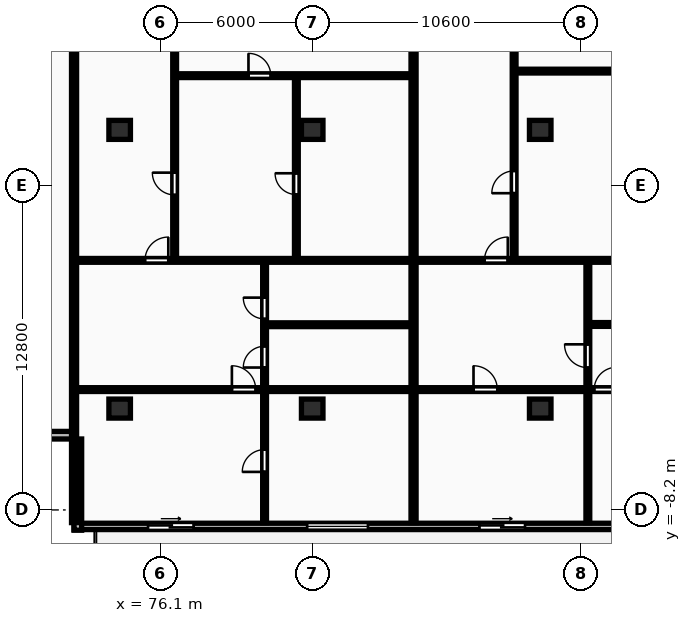
"""IFC4 building model, lengths in metres.
Left out: names, types, materials, properties, quantities, classifications, styles, units other than length and angle.
Written with IfcOpenShell. Run it as: python <this file> out.ifc"""

import sys

from ifc_helpers import new_model, si_unit, direction, frame, frame_2d, origin, origin_2d, place, context, subcontext, project, spatial, rectangle, extrude, element, fill, save


model = new_model("IFC4")
c1 = context("Model", 3, precision=1e-05, world=origin(), true_north=direction((0.0, 1.0)))
c2 = subcontext(c1, "Body", "Model", "MODEL_VIEW")
j1 = project(units=[si_unit("LENGTHUNIT", "METRE"), si_unit("PLANEANGLEUNIT", "RADIAN")], contexts=[c1])
p1 = place(None, origin())
s1 = spatial("IfcSite", under=j1, at=p1, CompositionType="ELEMENT")
p2 = place(p1, origin())
s2 = spatial("IfcBuilding", under=s1, at=p2, CompositionType="ELEMENT")
p3 = place(p2, frame((0.0, 0.0, 80.8)))
s3 = spatial("IfcBuildingStorey", under=s2, at=p3, CompositionType="ELEMENT", Elevation=80.8)
for number, where, z_axis, x_axis in (
    (1, (74.5, -4.2, 0.0), (0.0, 0.0, 1.0), (1.0, 0.0, 0.0)),
    (2, (74.5, 6.8, 0.0), (0.0, 0.0, 1.0), (1.0, 0.0, 0.0)),
    (3, (82.1, -4.2, 0.0), (0.0, 0.0, 1.0), (1.0, 0.0, 0.0)),
    (4, (82.1, 6.8, 0.0), (0.0, 0.0, 1.0), (1.0, 0.0, 0.0)),
    (5, (91.1, -4.2, 0.0), (0.0, 0.0, 1.0), (1.0, 0.0, 0.0)),
    (6, (91.1, 6.8, 0.0), (0.0, 0.0, 1.0), (1.0, 0.0, 0.0)),
):
    element("IfcColumn", number, at=place(p3, frame(where, z_axis=z_axis, x_axis=x_axis)), inside=s3, PredefinedType="COLUMN", context=c2, shape_type="SweptSolid", body=[
        extrude(rectangle(XDim=0.85, YDim=0.75, at=origin_2d()), origin(), (0.0, 0.0, 1.0), 3.25),
    ])
p4 = place(p3, frame((72.7, -8.85, 0.0), z_axis=(0.0, 0.0, 1.0), x_axis=(1.0, 0.0, 0.0)))
e7 = element("IfcWall", 7, at=p4, inside=s3, PredefinedType="STANDARD", context=c2, shape_type="SweptSolid", body=[
    extrude(rectangle(XDim=58.0, YDim=0.25, at=frame_2d((29.0, 0.0))), origin(), (0.0, 0.0, 1.0), 2.97),
])
p5 = place(p4, frame((2.92, 0.0, 0.0)))
e8 = element("IfcOpeningElement", 8, at=p5, cuts=e7, PredefinedType="OPENING", context=c2, shape_type="SweptSolid", body=[
    extrude(rectangle(XDim=1.8, YDim=2.2, at=frame_2d((0.9, 1.1))), frame((0.0, 0.135, 0.0), z_axis=(0.0, -1.0, 0.0), x_axis=(1.0, 0.0, 0.0)), (0.0, 0.0, 1.0), 0.27),
])
p6 = place(p4, frame((9.2, 0.0, 0.85)))
e9 = element("IfcOpeningElement", 9, at=p6, cuts=e7, PredefinedType="OPENING", context=c2, shape_type="SweptSolid", body=[
    extrude(rectangle(XDim=2.4, YDim=1.9, at=frame_2d((1.2, 0.95))), frame((0.0, 0.135, 0.0), z_axis=(0.0, -1.0, 0.0), x_axis=(1.0, 0.0, 0.0)), (0.0, 0.0, 1.0), 0.27),
])
p7 = place(p4, frame((21.7, 0.0, 0.85)))
e10 = element("IfcOpeningElement", 10, at=p7, cuts=e7, PredefinedType="OPENING", context=c2, shape_type="SweptSolid", body=[
    extrude(rectangle(XDim=2.4, YDim=1.9, at=frame_2d((1.2, 0.95))), frame((0.0, 0.135, 0.0), z_axis=(0.0, -1.0, 0.0), x_axis=(1.0, 0.0, 0.0)), (0.0, 0.0, 1.0), 0.27),
])
p8 = place(p4, frame((16.0, 0.0, 0.0)))
e11 = element("IfcOpeningElement", 11, at=p8, cuts=e7, PredefinedType="OPENING", context=c2, shape_type="SweptSolid", body=[
    extrude(rectangle(XDim=1.8, YDim=2.2, at=frame_2d((0.9, 1.1))), frame((0.0, 0.135, 0.0), z_axis=(0.0, -1.0, 0.0), x_axis=(1.0, 0.0, 0.0)), (0.0, 0.0, 1.0), 0.27),
])
p9 = place(p4, frame((27.1, 0.0, 0.85)))
e12 = element("IfcOpeningElement", 12, at=p9, cuts=e7, PredefinedType="OPENING", context=c2, shape_type="SweptSolid", body=[
    extrude(rectangle(XDim=2.4, YDim=1.9, at=frame_2d((1.2, 0.95))), frame((0.0, 0.135, 0.0), z_axis=(0.0, -1.0, 0.0), x_axis=(1.0, 0.0, 0.0)), (0.0, 0.0, 1.0), 0.27),
])
p10 = place(p4, frame((35.85, 0.0, 0.0)))
e13 = element("IfcOpeningElement", 13, at=p10, cuts=e7, PredefinedType="OPENING", context=c2, shape_type="SweptSolid", body=[
    extrude(rectangle(XDim=1.8, YDim=2.2, at=frame_2d((0.9, 1.1))), frame((0.0, 0.135, 0.0), z_axis=(0.0, -1.0, 0.0), x_axis=(1.0, 0.0, 0.0)), (0.0, 0.0, 1.0), 0.27),
])
p11 = place(p4, frame((42.93, 0.0, 0.85)))
e14 = element("IfcOpeningElement", 14, at=p11, cuts=e7, PredefinedType="OPENING", context=c2, shape_type="SweptSolid", body=[
    extrude(rectangle(XDim=1.8, YDim=1.8, at=frame_2d((0.9, 0.9))), frame((0.0, 0.135, 0.0), z_axis=(0.0, -1.0, 0.0), x_axis=(1.0, 0.0, 0.0)), (0.0, 0.0, 1.0), 0.27),
])
p12 = place(p4, frame((49.12, 0.0, 0.0)))
e15 = element("IfcOpeningElement", 15, at=p12, cuts=e7, PredefinedType="OPENING", context=c2, shape_type="SweptSolid", body=[
    extrude(rectangle(XDim=1.8, YDim=2.2, at=frame_2d((0.9, 1.1))), frame((0.0, 0.135, 0.0), z_axis=(0.0, -1.0, 0.0), x_axis=(1.0, 0.0, 0.0)), (0.0, 0.0, 1.0), 0.27),
])
p13 = place(p4, frame((54.9, 0.0, 0.85)))
e16 = element("IfcOpeningElement", 16, at=p13, cuts=e7, PredefinedType="OPENING", context=c2, shape_type="SweptSolid", body=[
    extrude(rectangle(XDim=2.4, YDim=1.9, at=frame_2d((1.2, 0.95))), frame((0.0, 0.135, 0.0), z_axis=(0.0, -1.0, 0.0), x_axis=(1.0, 0.0, 0.0)), (0.0, 0.0, 1.0), 0.27),
])
p14 = place(p3, frame((69.1, -5.25, 0.0), z_axis=(0.0, 0.0, 1.0), x_axis=(1.0, 0.0, 0.0)))
e17 = element("IfcWall", 17, at=p14, inside=s3, PredefinedType="STANDARD", context=c2, shape_type="SweptSolid", body=[
    extrude(rectangle(XDim=3.6, YDim=0.3, at=frame_2d((1.8, 0.0))), origin(), (0.0, 0.0, 1.0), 2.97),
])
p15 = place(p3, frame((72.85, -5.4, 0.0), z_axis=(0.0, 0.0, 1.0), x_axis=(0.0, -1.0, 0.0)))
e18 = element("IfcWall", 18, at=p15, inside=s3, PredefinedType="STANDARD", context=c2, shape_type="SweptSolid", body=[
    extrude(rectangle(XDim=3.6, YDim=0.3, at=frame_2d((1.8, 0.0))), origin(), (0.0, 0.0, 1.0), 2.97),
])
for number, where, z_axis, x_axis in (
    (19, (72.7, -8.7, 0.0), (0.0, 0.0, 1.0), (0.0, 1.0, 0.0)),
    (20, (86.1, -8.7, 0.0), (0.0, 0.0, 1.0), (0.0, 1.0, 0.0)),
):
    element("IfcWall", number, at=place(p3, frame(where, z_axis=z_axis, x_axis=x_axis)), inside=s3, PredefinedType="PARTITIONING", context=c2, shape_type="SweptSolid", body=[
        extrude(rectangle(XDim=24.87, YDim=0.2, at=frame_2d((12.435, 0.0))), origin(), (0.0, 0.0, 1.0), 2.97),
    ])
p16 = place(p3, frame((81.475, 1.69, 0.0), z_axis=(0.0, 0.0, 1.0), x_axis=(0.0, 1.0, 0.0)))
e21 = element("IfcWall", 21, at=p16, inside=s3, PredefinedType="PARTITIONING", context=c2, shape_type="SweptSolid", body=[
    extrude(rectangle(XDim=7.25, YDim=0.15, at=frame_2d((3.625, 0.0))), origin(), (0.0, 0.0, 1.0), 2.97),
])
p17 = place(p16, frame((2.558, 0.0, 0.0)))
e22 = element("IfcOpeningElement", 22, at=p17, cuts=e21, PredefinedType="OPENING", context=c2, shape_type="SweptSolid", body=[
    extrude(rectangle(XDim=0.84, YDim=2.04, at=frame_2d((0.42, 1.02))), frame((0.0, 0.085, 0.0), z_axis=(0.0, -1.0, 0.0), x_axis=(1.0, 0.0, 0.0)), (0.0, 0.0, 1.0), 0.17),
])
p18 = place(p3, frame((76.73, 8.94, 0.0), z_axis=(0.0, 0.0, 1.0), x_axis=(1.0, 0.0, 0.0)))
e23 = element("IfcWall", 23, at=p18, inside=s3, PredefinedType="PARTITIONING", context=c2, shape_type="SweptSolid", body=[
    extrude(rectangle(XDim=9.29, YDim=0.15, at=frame_2d((4.645, 0.0))), origin(), (0.0, 0.0, 1.0), 2.97),
])
p19 = place(p18, frame((2.854, 0.0, 0.0)))
e24 = element("IfcOpeningElement", 24, at=p19, cuts=e23, PredefinedType="OPENING", context=c2, shape_type="SweptSolid", body=[
    extrude(rectangle(XDim=0.88, YDim=2.06, at=frame_2d((0.44, 1.03))), frame((0.0, 0.085, 0.0), z_axis=(0.0, -1.0, 0.0), x_axis=(1.0, 0.0, 0.0)), (0.0, 0.0, 1.0), 0.17),
])
p20 = place(p3, frame((76.67, 1.69, 0.0), z_axis=(0.0, 0.0, 1.0), x_axis=(0.0, 1.0, 0.0)))
e25 = element("IfcWall", 25, at=p20, inside=s3, PredefinedType="PARTITIONING", context=c2, shape_type="SweptSolid", body=[
    extrude(rectangle(XDim=14.5, YDim=0.15, at=frame_2d((7.25, 0.0))), origin(), (0.0, 0.0, 1.0), 2.97),
])
p21 = place(p20, frame((2.542, 0.0, 0.0)))
e26 = element("IfcOpeningElement", 26, at=p21, cuts=e25, PredefinedType="OPENING", context=c2, shape_type="SweptSolid", body=[
    extrude(rectangle(XDim=0.88, YDim=2.06, at=frame_2d((0.44, 1.03))), frame((0.0, 0.085, 0.0), z_axis=(0.0, -1.0, 0.0), x_axis=(1.0, 0.0, 0.0)), (0.0, 0.0, 1.0), 0.17),
])
p22 = place(p3, frame((80.28, -0.89, 0.0), z_axis=(0.0, 0.0, 1.0), x_axis=(1.0, 0.0, 0.0)))
e27 = element("IfcWall", 27, at=p22, inside=s3, PredefinedType="PARTITIONING", context=c2, shape_type="SweptSolid", body=[
    extrude(rectangle(XDim=5.74, YDim=0.15, at=frame_2d((2.87, 0.0))), origin(), (0.0, 0.0, 1.0), 2.97),
])
p23 = place(p3, frame((80.22, -8.7, 0.0), z_axis=(0.0, 0.0, 1.0), x_axis=(0.0, 1.0, 0.0)))
e28 = element("IfcWall", 28, at=p23, inside=s3, PredefinedType="PARTITIONING", context=c2, shape_type="SweptSolid", body=[
    extrude(rectangle(XDim=10.31, YDim=0.15, at=frame_2d((5.155, 0.0))), origin(), (0.0, 0.0, 1.0), 2.97),
])
p24 = place(p23, frame((6.12, 0.0, 0.0)))
e29 = element("IfcOpeningElement", 29, at=p24, cuts=e28, PredefinedType="OPENING", context=c2, shape_type="SweptSolid", body=[
    extrude(rectangle(XDim=0.84, YDim=2.04, at=frame_2d((0.42, 1.02))), frame((0.0, 0.085, 0.0), z_axis=(0.0, -1.0, 0.0), x_axis=(1.0, 0.0, 0.0)), (0.0, 0.0, 1.0), 0.17),
])
p25 = place(p23, frame((8.04, 0.0, 0.0)))
e30 = element("IfcOpeningElement", 30, at=p25, cuts=e28, PredefinedType="OPENING", context=c2, shape_type="SweptSolid", body=[
    extrude(rectangle(XDim=0.84, YDim=2.04, at=frame_2d((0.42, 1.02))), frame((0.0, 0.085, 0.0), z_axis=(0.0, -1.0, 0.0), x_axis=(1.0, 0.0, 0.0)), (0.0, 0.0, 1.0), 0.17),
])
p26 = place(p23, frame((2.001, 0.0, 0.0)))
e31 = element("IfcOpeningElement", 31, at=p26, cuts=e28, PredefinedType="OPENING", context=c2, shape_type="SweptSolid", body=[
    extrude(rectangle(XDim=0.88, YDim=2.06, at=frame_2d((0.44, 1.03))), frame((0.0, 0.085, 0.0), z_axis=(0.0, -1.0, 0.0), x_axis=(1.0, 0.0, 0.0)), (0.0, 0.0, 1.0), 0.17),
])
p27 = place(p3, frame((72.78, 1.65, 0.0), z_axis=(0.0, 0.0, 1.0), x_axis=(1.0, 0.0, 0.0)))
e32 = element("IfcWall", 32, at=p27, inside=s3, PredefinedType="PARTITIONING", context=c2, shape_type="SweptSolid", body=[
    extrude(rectangle(XDim=13.24, YDim=0.15, at=frame_2d((6.62, 0.0))), origin(), (0.0, 0.0, 1.0), 2.97),
])
p28 = place(p27, frame((2.72, 0.0, 0.0)))
e33 = element("IfcOpeningElement", 33, at=p28, cuts=e32, PredefinedType="OPENING", context=c2, shape_type="SweptSolid", body=[
    extrude(rectangle(XDim=0.92, YDim=2.08, at=frame_2d((0.46, 1.04))), frame((0.0, 0.085, 0.0), z_axis=(0.0, -1.0, 0.0), x_axis=(1.0, 0.0, 0.0)), (0.0, 0.0, 1.0), 0.17),
])
p29 = place(p3, frame((72.78, -3.45, 0.0), z_axis=(0.0, 0.0, 1.0), x_axis=(1.0, 0.0, 0.0)))
e34 = element("IfcWall", 34, at=p29, inside=s3, PredefinedType="PARTITIONING", context=c2, shape_type="SweptSolid", body=[
    extrude(rectangle(XDim=13.24, YDim=0.15, at=frame_2d((6.62, 0.0))), origin(), (0.0, 0.0, 1.0), 2.97),
])
p30 = place(p29, frame((6.15, 0.0, 0.0)))
e35 = element("IfcOpeningElement", 35, at=p30, cuts=e34, PredefinedType="OPENING", context=c2, shape_type="SweptSolid", body=[
    extrude(rectangle(XDim=0.94, YDim=2.1, at=frame_2d((0.47, 1.05))), frame((0.0, 0.085, 0.0), z_axis=(0.0, -1.0, 0.0), x_axis=(1.0, 0.0, 0.0)), (0.0, 0.0, 1.0), 0.17),
])
p31 = place(p3, frame((90.13, 9.12, 0.0), z_axis=(0.0, 0.0, 1.0), x_axis=(1.0, 0.0, 0.0)))
e36 = element("IfcWall", 36, at=p31, inside=s3, PredefinedType="PARTITIONING", context=c2, shape_type="SweptSolid", body=[
    extrude(rectangle(XDim=13.69, YDim=0.15, at=frame_2d((6.845, 0.0))), origin(), (0.0, 0.0, 1.0), 2.97),
])
p32 = place(p31, frame((5.625, 0.0, 0.0)))
e37 = element("IfcOpeningElement", 37, at=p32, cuts=e36, PredefinedType="OPENING", context=c2, shape_type="SweptSolid", body=[
    extrude(rectangle(XDim=0.88, YDim=2.06, at=frame_2d((0.44, 1.03))), frame((0.0, 0.085, 0.0), z_axis=(0.0, -1.0, 0.0), x_axis=(1.0, 0.0, 0.0)), (0.0, 0.0, 1.0), 0.17),
])
p33 = place(p3, frame((90.07, 1.69, 0.0), z_axis=(0.0, 0.0, 1.0), x_axis=(0.0, 1.0, 0.0)))
e38 = element("IfcWall", 38, at=p33, inside=s3, PredefinedType="PARTITIONING", context=c2, shape_type="SweptSolid", body=[
    extrude(rectangle(XDim=14.5, YDim=0.15, at=frame_2d((7.25, 0.0))), origin(), (0.0, 0.0, 1.0), 2.97),
])
p34 = place(p33, frame((2.611, 0.0, 0.0)))
e39 = element("IfcOpeningElement", 39, at=p34, cuts=e38, PredefinedType="OPENING", context=c2, shape_type="SweptSolid", body=[
    extrude(rectangle(XDim=0.88, YDim=2.06, at=frame_2d((0.44, 1.03))), frame((0.0, 0.085, 0.0), z_axis=(0.0, -1.0, 0.0), x_axis=(1.0, 0.0, 0.0)), (0.0, 0.0, 1.0), 0.17),
])
p35 = place(p3, frame((92.98, -8.7, 0.0), z_axis=(0.0, 0.0, 1.0), x_axis=(0.0, 1.0, 0.0)))
e40 = element("IfcWall", 40, at=p35, inside=s3, PredefinedType="PARTITIONING", context=c2, shape_type="SweptSolid", body=[
    extrude(rectangle(XDim=10.31, YDim=0.15, at=frame_2d((5.155, 0.0))), origin(), (0.0, 0.0, 1.0), 2.97),
])
p36 = place(p35, frame((6.116, 0.0, 0.0)))
e41 = element("IfcOpeningElement", 41, at=p36, cuts=e40, PredefinedType="OPENING", context=c2, shape_type="SweptSolid", body=[
    extrude(rectangle(XDim=0.92, YDim=2.08, at=frame_2d((0.46, 1.04))), frame((0.0, 0.085, 0.0), z_axis=(0.0, -1.0, 0.0), x_axis=(1.0, 0.0, 0.0)), (0.0, 0.0, 1.0), 0.17),
])
p37 = place(p3, frame((93.02, -0.88, 0.0), z_axis=(0.0, 0.0, 1.0), x_axis=(1.0, 0.0, 0.0)))
e42 = element("IfcWall", 42, at=p37, inside=s3, PredefinedType="PARTITIONING", context=c2, shape_type="SweptSolid", body=[
    extrude(rectangle(XDim=10.8, YDim=0.15, at=frame_2d((5.4, 0.0))), origin(), (0.0, 0.0, 1.0), 2.97),
])
p38 = place(p37, frame((4.11, 0.0, 0.0)))
e43 = element("IfcOpeningElement", 43, at=p38, cuts=e42, PredefinedType="OPENING", context=c2, shape_type="SweptSolid", body=[
    extrude(rectangle(XDim=0.84, YDim=2.04, at=frame_2d((0.42, 1.02))), frame((0.0, 0.085, 0.0), z_axis=(0.0, -1.0, 0.0), x_axis=(1.0, 0.0, 0.0)), (0.0, 0.0, 1.0), 0.17),
])
p39 = place(p37, frame((5.45, 0.0, 0.0)))
e44 = element("IfcOpeningElement", 44, at=p39, cuts=e42, PredefinedType="OPENING", context=c2, shape_type="SweptSolid", body=[
    extrude(rectangle(XDim=0.84, YDim=2.04, at=frame_2d((0.42, 1.02))), frame((0.0, 0.085, 0.0), z_axis=(0.0, -1.0, 0.0), x_axis=(1.0, 0.0, 0.0)), (0.0, 0.0, 1.0), 0.17),
])
p40 = place(p3, frame((86.18, 1.65, 0.0), z_axis=(0.0, 0.0, 1.0), x_axis=(1.0, 0.0, 0.0)))
e45 = element("IfcWall", 45, at=p40, inside=s3, PredefinedType="PARTITIONING", context=c2, shape_type="SweptSolid", body=[
    extrude(rectangle(XDim=17.64, YDim=0.15, at=frame_2d((8.82, 0.0))), origin(), (0.0, 0.0, 1.0), 2.97),
])
p41 = place(p40, frame((2.72, 0.0, 0.0)))
e46 = element("IfcOpeningElement", 46, at=p41, cuts=e45, PredefinedType="OPENING", context=c2, shape_type="SweptSolid", body=[
    extrude(rectangle(XDim=0.92, YDim=2.08, at=frame_2d((0.46, 1.04))), frame((0.0, 0.085, 0.0), z_axis=(0.0, -1.0, 0.0), x_axis=(1.0, 0.0, 0.0)), (0.0, 0.0, 1.0), 0.17),
])
p42 = place(p3, frame((86.18, -3.45, 0.0), z_axis=(0.0, 0.0, 1.0), x_axis=(1.0, 0.0, 0.0)))
e47 = element("IfcWall", 47, at=p42, inside=s3, PredefinedType="PARTITIONING", context=c2, shape_type="SweptSolid", body=[
    extrude(rectangle(XDim=12.04, YDim=0.15, at=frame_2d((6.02, 0.0))), origin(), (0.0, 0.0, 1.0), 2.97),
])
p43 = place(p42, frame((2.287, 0.0, 0.0)))
e48 = element("IfcOpeningElement", 48, at=p43, cuts=e47, PredefinedType="OPENING", context=c2, shape_type="SweptSolid", body=[
    extrude(rectangle(XDim=0.94, YDim=2.1, at=frame_2d((0.47, 1.05))), frame((0.0, 0.085, 0.0), z_axis=(0.0, -1.0, 0.0), x_axis=(1.0, 0.0, 0.0)), (0.0, 0.0, 1.0), 0.17),
])
p44 = place(p42, frame((7.05, 0.0, 0.0)))
e49 = element("IfcOpeningElement", 49, at=p44, cuts=e47, PredefinedType="OPENING", context=c2, shape_type="SweptSolid", body=[
    extrude(rectangle(XDim=0.88, YDim=2.06, at=frame_2d((0.44, 1.03))), frame((0.0, 0.085, 0.0), z_axis=(0.0, -1.0, 0.0), x_axis=(1.0, 0.0, 0.0)), (0.0, 0.0, 1.0), 0.17),
])
p45 = place(p5, origin())
e50 = element("IfcDoor", 50, at=p45, inside=s3, OperationType="SLIDING_TO_RIGHT", PredefinedType="DOOR", context=c2, shape_type="SweptSolid", body=[
    extrude(rectangle(XDim=1.8, YDim=2.2, at=frame_2d((0.9, 1.1))), frame((0.0, 0.025, 0.0), z_axis=(0.0, -1.0, 0.0), x_axis=(1.0, 0.0, 0.0)), (0.0, 0.0, 1.0), 0.05),
])
fill(e8, e50)
p46 = place(p6, origin())
e51 = element("IfcWindow", 51, at=p46, inside=s3, PartitioningType="DOUBLE_PANEL_VERTICAL", PredefinedType="WINDOW", context=c2, shape_type="SweptSolid", body=[
    extrude(rectangle(XDim=2.4, YDim=1.9, at=frame_2d((1.2, 0.95))), frame((0.0, 0.03, 0.0), z_axis=(0.0, -1.0, 0.0), x_axis=(1.0, 0.0, 0.0)), (0.0, 0.0, 1.0), 0.06),
])
fill(e9, e51)
p47 = place(p8, origin())
e52 = element("IfcDoor", 52, at=p47, inside=s3, OperationType="SLIDING_TO_RIGHT", PredefinedType="DOOR", context=c2, shape_type="SweptSolid", body=[
    extrude(rectangle(XDim=1.8, YDim=2.2, at=frame_2d((0.9, 1.1))), frame((0.0, 0.025, 0.0), z_axis=(0.0, -1.0, 0.0), x_axis=(1.0, 0.0, 0.0)), (0.0, 0.0, 1.0), 0.05),
])
fill(e11, e52)
p48 = place(p17, origin())
e53 = element("IfcDoor", 53, at=p48, inside=s3, OperationType="SINGLE_SWING_RIGHT", PredefinedType="DOOR", context=c2, shape_type="SweptSolid", body=[
    extrude(rectangle(XDim=0.84, YDim=2.04, at=frame_2d((0.42, 1.02))), frame((0.0, 0.025, 0.0), z_axis=(0.0, -1.0, 0.0), x_axis=(1.0, 0.0, 0.0)), (0.0, 0.0, 1.0), 0.05),
])
fill(e22, e53)
p49 = place(p19, origin())
e54 = element("IfcDoor", 54, at=p49, inside=s3, OperationType="SINGLE_SWING_LEFT", PredefinedType="DOOR", context=c2, shape_type="SweptSolid", body=[
    extrude(rectangle(XDim=0.88, YDim=2.06, at=frame_2d((0.44, 1.03))), frame((0.0, 0.025, 0.0), z_axis=(0.0, -1.0, 0.0), x_axis=(1.0, 0.0, 0.0)), (0.0, 0.0, 1.0), 0.05),
])
fill(e24, e54)
p50 = place(p21, origin())
e55 = element("IfcDoor", 55, at=p50, inside=s3, OperationType="SINGLE_SWING_RIGHT", PredefinedType="DOOR", context=c2, shape_type="SweptSolid", body=[
    extrude(rectangle(XDim=0.88, YDim=2.06, at=frame_2d((0.44, 1.03))), frame((0.0, 0.025, 0.0), z_axis=(0.0, -1.0, 0.0), x_axis=(1.0, 0.0, 0.0)), (0.0, 0.0, 1.0), 0.05),
])
fill(e26, e55)
p51 = place(p24, origin())
e56 = element("IfcDoor", 56, at=p51, inside=s3, OperationType="SINGLE_SWING_LEFT", PredefinedType="DOOR", context=c2, shape_type="SweptSolid", body=[
    extrude(rectangle(XDim=0.84, YDim=2.04, at=frame_2d((0.42, 1.02))), frame((0.0, 0.025, 0.0), z_axis=(0.0, -1.0, 0.0), x_axis=(1.0, 0.0, 0.0)), (0.0, 0.0, 1.0), 0.05),
])
fill(e29, e56)
p52 = place(p25, origin())
e57 = element("IfcDoor", 57, at=p52, inside=s3, OperationType="SINGLE_SWING_RIGHT", PredefinedType="DOOR", context=c2, shape_type="SweptSolid", body=[
    extrude(rectangle(XDim=0.84, YDim=2.04, at=frame_2d((0.42, 1.02))), frame((0.0, 0.025, 0.0), z_axis=(0.0, -1.0, 0.0), x_axis=(1.0, 0.0, 0.0)), (0.0, 0.0, 1.0), 0.05),
])
fill(e30, e57)
p53 = place(p26, origin())
e58 = element("IfcDoor", 58, at=p53, inside=s3, OperationType="SINGLE_SWING_LEFT", PredefinedType="DOOR", context=c2, shape_type="SweptSolid", body=[
    extrude(rectangle(XDim=0.88, YDim=2.06, at=frame_2d((0.44, 1.03))), frame((0.0, 0.025, 0.0), z_axis=(0.0, -1.0, 0.0), x_axis=(1.0, 0.0, 0.0)), (0.0, 0.0, 1.0), 0.05),
])
fill(e31, e58)
p54 = place(p28, origin())
e59 = element("IfcDoor", 59, at=p54, inside=s3, OperationType="SINGLE_SWING_RIGHT", PredefinedType="DOOR", context=c2, shape_type="SweptSolid", body=[
    extrude(rectangle(XDim=0.92, YDim=2.08, at=frame_2d((0.46, 1.04))), frame((0.0, 0.025, 0.0), z_axis=(0.0, -1.0, 0.0), x_axis=(1.0, 0.0, 0.0)), (0.0, 0.0, 1.0), 0.05),
])
fill(e33, e59)
p55 = place(p30, origin())
e60 = element("IfcDoor", 60, at=p55, inside=s3, OperationType="SINGLE_SWING_LEFT", PredefinedType="DOOR", context=c2, shape_type="SweptSolid", body=[
    extrude(rectangle(XDim=0.94, YDim=2.1, at=frame_2d((0.47, 1.05))), frame((0.0, 0.025, 0.0), z_axis=(0.0, -1.0, 0.0), x_axis=(1.0, 0.0, 0.0)), (0.0, 0.0, 1.0), 0.05),
])
fill(e35, e60)
p56 = place(p34, origin())
e61 = element("IfcDoor", 61, at=p56, inside=s3, OperationType="SINGLE_SWING_LEFT", PredefinedType="DOOR", context=c2, shape_type="SweptSolid", body=[
    extrude(rectangle(XDim=0.88, YDim=2.06, at=frame_2d((0.44, 1.03))), frame((0.0, 0.025, 0.0), z_axis=(0.0, -1.0, 0.0), x_axis=(1.0, 0.0, 0.0)), (0.0, 0.0, 1.0), 0.05),
])
fill(e39, e61)
p57 = place(p36, origin())
e62 = element("IfcDoor", 62, at=p57, inside=s3, OperationType="SINGLE_SWING_RIGHT", PredefinedType="DOOR", context=c2, shape_type="SweptSolid", body=[
    extrude(rectangle(XDim=0.92, YDim=2.08, at=frame_2d((0.46, 1.04))), frame((0.0, 0.025, 0.0), z_axis=(0.0, -1.0, 0.0), x_axis=(1.0, 0.0, 0.0)), (0.0, 0.0, 1.0), 0.05),
])
fill(e41, e62)
p58 = place(p41, origin())
e63 = element("IfcDoor", 63, at=p58, inside=s3, OperationType="SINGLE_SWING_RIGHT", PredefinedType="DOOR", context=c2, shape_type="SweptSolid", body=[
    extrude(rectangle(XDim=0.92, YDim=2.08, at=frame_2d((0.46, 1.04))), frame((0.0, 0.025, 0.0), z_axis=(0.0, -1.0, 0.0), x_axis=(1.0, 0.0, 0.0)), (0.0, 0.0, 1.0), 0.05),
])
fill(e46, e63)
p59 = place(p43, origin())
e64 = element("IfcDoor", 64, at=p59, inside=s3, OperationType="SINGLE_SWING_LEFT", PredefinedType="DOOR", context=c2, shape_type="SweptSolid", body=[
    extrude(rectangle(XDim=0.94, YDim=2.1, at=frame_2d((0.47, 1.05))), frame((0.0, 0.025, 0.0), z_axis=(0.0, -1.0, 0.0), x_axis=(1.0, 0.0, 0.0)), (0.0, 0.0, 1.0), 0.05),
])
fill(e48, e64)
p60 = place(p44, origin())
e65 = element("IfcDoor", 65, at=p60, inside=s3, OperationType="SINGLE_SWING_RIGHT", PredefinedType="DOOR", context=c2, shape_type="SweptSolid", body=[
    extrude(rectangle(XDim=0.88, YDim=2.06, at=frame_2d((0.44, 1.03))), frame((0.0, 0.025, 0.0), z_axis=(0.0, -1.0, 0.0), x_axis=(1.0, 0.0, 0.0)), (0.0, 0.0, 1.0), 0.05),
])
fill(e49, e65)
save(model, sys.argv[1])
